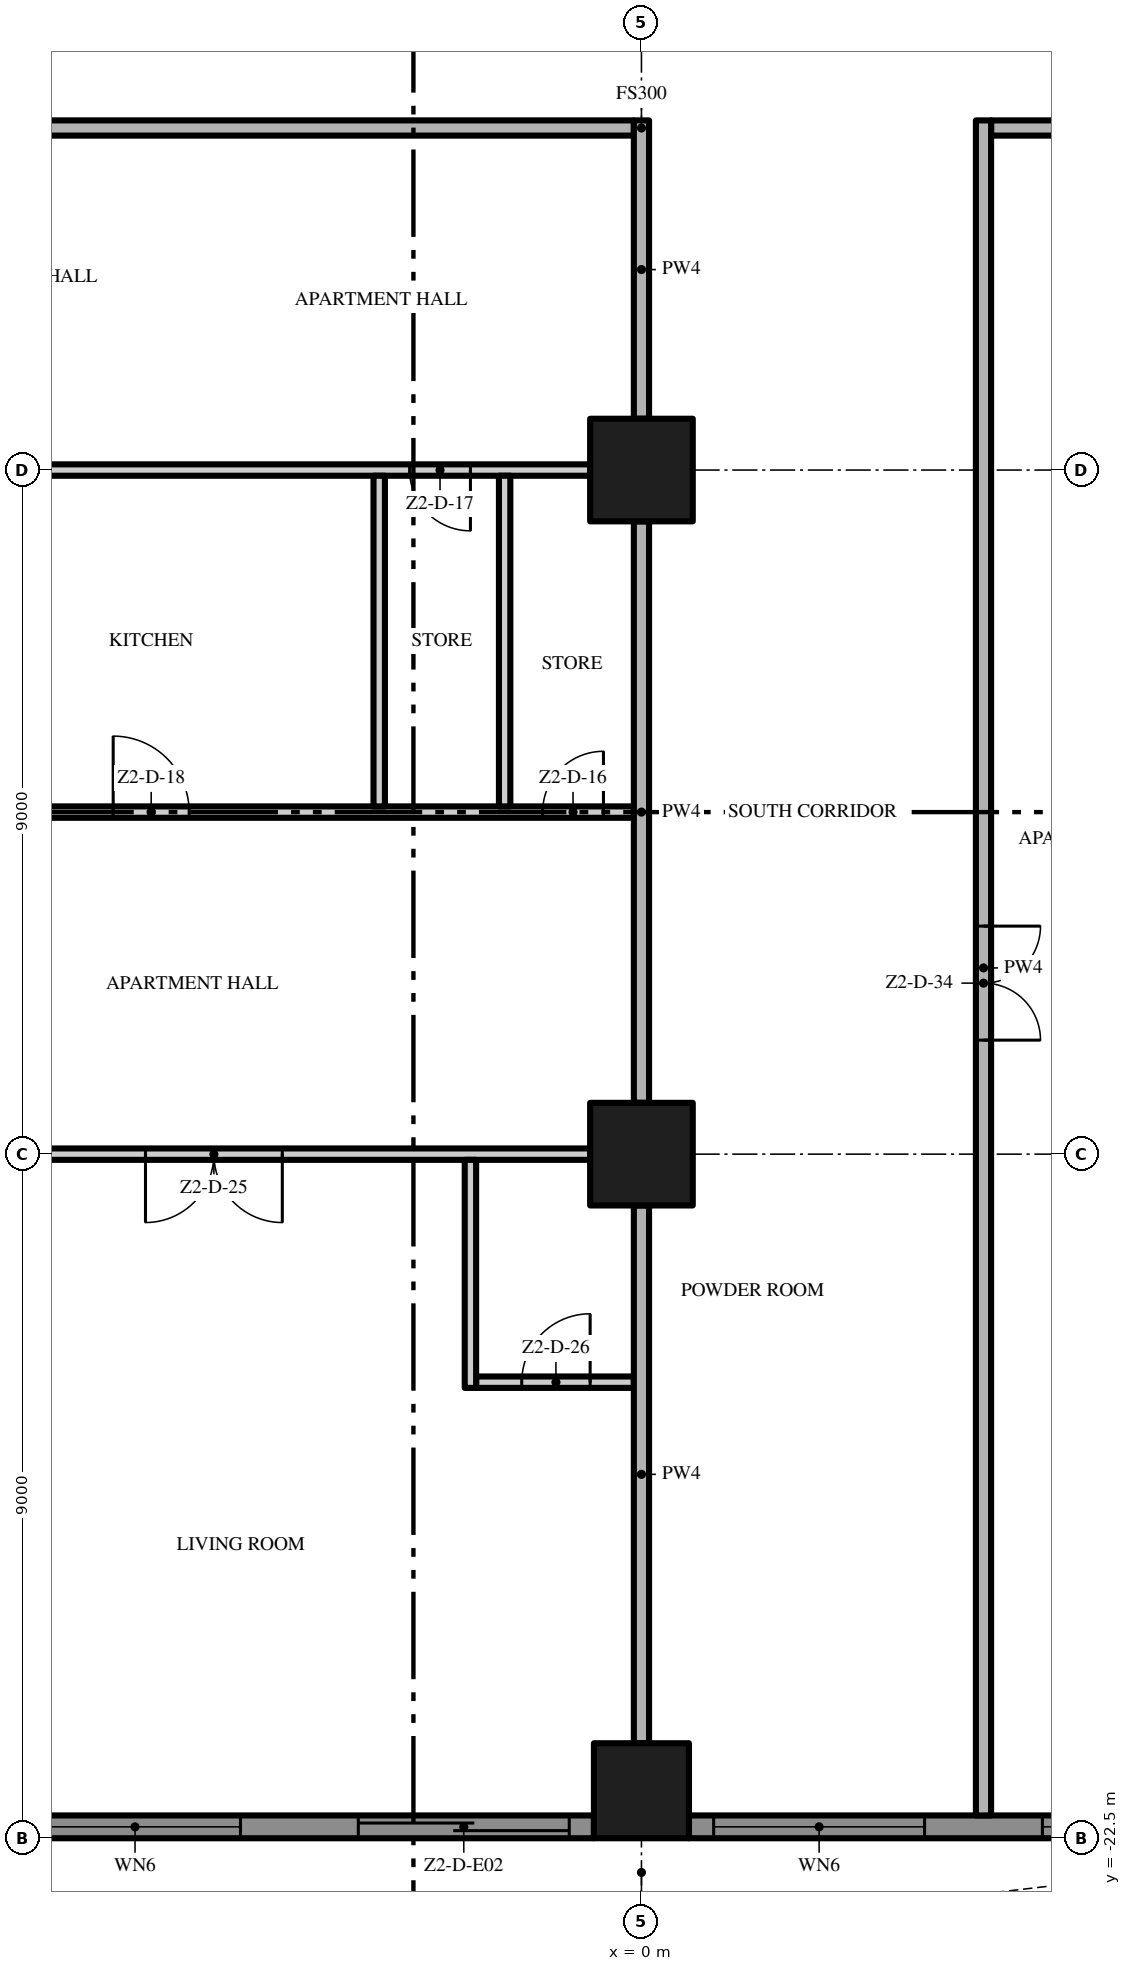
"""IFC4 building model, lengths in metres.
Left out: names, types, materials, properties, quantities, classifications, styles, units other than length and angle.
Written with IfcOpenShell. Run it as: python <this file> out.ifc"""

import sys

from ifc_helpers import new_model, si_unit, direction, frame, frame_2d, origin, origin_2d, place, context, subcontext, project, spatial, polyline, rectangle, outline, extrude, element, fill, save


model = new_model("IFC4")
c1 = context("Model", 3, precision=1e-05, world=origin(), true_north=direction((0.0, 1.0)))
c2 = subcontext(c1, "Body", "Model", "MODEL_VIEW")
j1 = project(units=[si_unit("LENGTHUNIT", "METRE"), si_unit("PLANEANGLEUNIT", "RADIAN")], contexts=[c1])
p1 = place(None, origin())
s1 = spatial("IfcSite", under=j1, at=p1, CompositionType="ELEMENT")
p2 = place(p1, origin())
s2 = spatial("IfcBuilding", under=s1, at=p2, CompositionType="ELEMENT")
p3 = place(p2, frame((0.0, 0.0, 103.6)))
s3 = spatial("IfcBuildingStorey", under=s2, at=p3, CompositionType="ELEMENT", Elevation=103.6)
p4 = place(p3, frame((0.0, -13.5, 0.0), z_axis=(0.0, 0.0, 1.0), x_axis=(1.0, 0.0, 0.0)))
e1 = element("IfcColumn", 1, at=p4, inside=s3, PredefinedType="COLUMN", context=c2, shape_type="SweptSolid", body=[
    extrude(rectangle(XDim=1.35, YDim=1.35, at=origin_2d()), origin(), (0.0, 0.0, 1.0), 3.5),
])
p5 = place(p3, frame((0.0, -21.875, 0.0), z_axis=(0.0, 0.0, 1.0), x_axis=(1.0, 0.0, 0.0)))
e2 = element("IfcColumn", 2, at=p5, inside=s3, PredefinedType="COLUMN", context=c2, shape_type="SweptSolid", body=[
    extrude(rectangle(XDim=1.25, YDim=1.25, at=origin_2d()), origin(), (0.0, 0.0, 1.0), 3.5),
])
p6 = place(p3, frame((0.0, -4.5, 0.0), z_axis=(0.0, 0.0, 1.0), x_axis=(1.0, 0.0, 0.0)))
e3 = element("IfcColumn", 3, at=p6, inside=s3, PredefinedType="COLUMN", context=c2, shape_type="SweptSolid", body=[
    extrude(rectangle(XDim=1.35, YDim=1.35, at=origin_2d()), origin(), (0.0, 0.0, 1.0), 3.5),
])
p7 = place(p3, frame((-0.625, -22.35, 0.0), z_axis=(0.0, 0.0, 1.0), x_axis=(-1.0, 0.0, 0.0)))
e4 = element("IfcWall", 4, at=p7, inside=s3, PredefinedType="SOLIDWALL", context=c2, shape_type="SweptSolid", body=[
    extrude(rectangle(XDim=7.75, YDim=0.3, at=frame_2d((3.875, 0.0))), origin(), (0.0, 0.0, 1.0), 3.5),
])
p8 = place(p7, frame((4.65, 0.0, 0.45)))
e5 = element("IfcOpeningElement", 5, at=p8, cuts=e4, PredefinedType="OPENING", context=c2, shape_type="SweptSolid", body=[
    extrude(rectangle(XDim=2.775, YDim=2.65, at=frame_2d((1.387, 1.325))), frame((0.0, 0.16, 0.0), z_axis=(0.0, -1.0, 0.0), x_axis=(1.0, 0.0, 0.0)), (0.0, 0.0, 1.0), 0.32),
])
p9 = place(p7, frame((0.325, 0.0, 0.0)))
e6 = element("IfcOpeningElement", 6, at=p9, cuts=e4, PredefinedType="OPENING", context=c2, shape_type="SweptSolid", body=[
    extrude(rectangle(XDim=2.775, YDim=2.4, at=frame_2d((1.387, 1.2))), frame((0.0, 0.16, 0.0), z_axis=(0.0, -1.0, 0.0), x_axis=(1.0, 0.0, 0.0)), (0.0, 0.0, 1.0), 0.32),
])
p10 = place(p3, frame((8.375, -22.35, 0.0), z_axis=(0.0, 0.0, 1.0), x_axis=(-1.0, 0.0, 0.0)))
e7 = element("IfcWall", 7, at=p10, inside=s3, PredefinedType="SOLIDWALL", context=c2, shape_type="SweptSolid", body=[
    extrude(rectangle(XDim=7.75, YDim=0.3, at=frame_2d((3.875, 0.0))), origin(), (0.0, 0.0, 1.0), 3.5),
])
p11 = place(p10, frame((4.65, 0.0, 0.45)))
e8 = element("IfcOpeningElement", 8, at=p11, cuts=e7, PredefinedType="OPENING", context=c2, shape_type="SweptSolid", body=[
    extrude(rectangle(XDim=2.775, YDim=2.65, at=frame_2d((1.387, 1.325))), frame((0.0, 0.16, 0.0), z_axis=(0.0, -1.0, 0.0), x_axis=(1.0, 0.0, 0.0)), (0.0, 0.0, 1.0), 0.32),
])
p12 = place(p10, frame((0.325, 0.0, 0.45)))
e9 = element("IfcOpeningElement", 9, at=p12, cuts=e7, PredefinedType="OPENING", context=c2, shape_type="SweptSolid", body=[
    extrude(rectangle(XDim=2.775, YDim=2.65, at=frame_2d((1.387, 1.325))), frame((0.0, 0.16, 0.0), z_axis=(0.0, -1.0, 0.0), x_axis=(1.0, 0.0, 0.0)), (0.0, 0.0, 1.0), 0.32),
])
p13 = place(p3, origin())
e10 = element("IfcWall", 10, at=p13, inside=s3, PredefinedType="USERDEFINED", context=c2, shape_type="SweptSolid", body=[
    extrude(outline(polyline([(-22.5, -23.451), (-21.0, -24.112), (-19.5, -24.845), (-18.0, -25.369), (-16.875, -25.5), (-16.5, -25.485), (-15.0, -25.149), (-13.5, -24.488), (-12.0, -23.755), (-10.5, -23.231), (-9.375, -23.1), (-9.0, -23.115), (-7.5, -23.451), (-6.0, -24.112), (-4.5, -24.845), (-3.0, -25.369), (-1.875, -25.5), (-1.5, -25.485), (0.0, -25.149), (1.5, -24.488), (3.0, -23.755), (4.5, -23.231), (5.625, -23.1), (6.0, -23.115), (7.5, -23.451), (9.0, -24.112), (10.5, -24.845), (12.0, -25.369), (13.125, -25.5), (13.5, -25.485), (15.0, -25.149), (16.5, -24.488), (18.0, -23.755), (19.5, -23.231), (20.625, -23.1), (21.0, -23.115), (22.5, -23.451), (22.555, -23.208), (21.033, -22.866), (20.615, -22.849), (19.444, -22.986), (17.904, -23.524), (16.395, -24.261), (14.921, -24.91), (13.467, -25.236), (13.135, -25.249), (12.056, -25.124), (10.596, -24.614), (9.105, -23.885), (7.579, -23.213), (6.033, -22.866), (5.615, -22.849), (4.444, -22.986), (2.904, -23.524), (1.395, -24.261), (-0.079, -24.91), (-1.533, -25.236), (-1.865, -25.249), (-2.944, -25.124), (-4.404, -24.614), (-5.895, -23.885), (-7.421, -23.213), (-8.967, -22.866), (-9.385, -22.849), (-10.556, -22.986), (-12.096, -23.524), (-13.605, -24.261), (-15.079, -24.91), (-16.533, -25.236), (-16.865, -25.249), (-17.944, -25.124), (-19.404, -24.614), (-20.895, -23.885), (-22.399, -23.223), (-22.5, -23.451)])), origin(), (0.0, 0.0, 1.0), 0.9),
])
p14 = place(p3, frame((-2.175, -16.5, 0.0), z_axis=(0.0, 0.0, 1.0), x_axis=(1.0, 0.0, 0.0)))
e11 = element("IfcWall", 11, at=p14, inside=s3, PredefinedType="PARTITIONING", context=c2, shape_type="SweptSolid", body=[
    extrude(rectangle(XDim=2.075, YDim=0.15, at=frame_2d((1.038, 0.0))), origin(), (0.0, 0.0, 1.0), 3.5),
])
p15 = place(p14, frame((0.6, 0.0, 0.0)))
e12 = element("IfcOpeningElement", 12, at=p15, cuts=e11, PredefinedType="OPENING", context=c2, shape_type="SweptSolid", body=[
    extrude(rectangle(XDim=0.9, YDim=2.1, at=frame_2d((0.45, 1.05))), frame((0.0, 0.085, 0.0), z_axis=(0.0, -1.0, 0.0), x_axis=(1.0, 0.0, 0.0)), (0.0, 0.0, 1.0), 0.17),
])
p16 = place(p3, frame((-0.675, -13.5, 0.0), z_axis=(0.0, 0.0, 1.0), x_axis=(-1.0, 0.0, 0.0)))
e13 = element("IfcWall", 13, at=p16, inside=s3, PredefinedType="PARTITIONING", context=c2, shape_type="SweptSolid", body=[
    extrude(rectangle(XDim=7.65, YDim=0.15, at=frame_2d((3.825, 0.0))), origin(), (0.0, 0.0, 1.0), 3.5),
])
p17 = place(p16, frame((4.05, 0.0, 0.0)))
e14 = element("IfcOpeningElement", 14, at=p17, cuts=e13, PredefinedType="OPENING", context=c2, shape_type="SweptSolid", body=[
    extrude(rectangle(XDim=1.8, YDim=2.4, at=frame_2d((0.9, 1.2))), frame((0.0, 0.085, 0.0), z_axis=(0.0, -1.0, 0.0), x_axis=(1.0, 0.0, 0.0)), (0.0, 0.0, 1.0), 0.17),
])
p18 = place(p3, frame((-11.625, -9.0, 0.0), z_axis=(0.0, 0.0, 1.0), x_axis=(1.0, 0.0, 0.0)))
e15 = element("IfcWall", 15, at=p18, inside=s3, PredefinedType="PARTITIONING", context=c2, shape_type="SweptSolid", body=[
    extrude(rectangle(XDim=11.525, YDim=0.15, at=frame_2d((5.763, 0.0))), origin(), (0.0, 0.0, 1.0), 3.5),
])
p19 = place(p18, frame((10.325, 0.0, 0.0)))
e16 = element("IfcOpeningElement", 16, at=p19, cuts=e15, PredefinedType="OPENING", context=c2, shape_type="SweptSolid", body=[
    extrude(rectangle(XDim=0.8, YDim=2.0, at=frame_2d((0.4, 1.0))), frame((0.0, 0.085, 0.0), z_axis=(0.0, -1.0, 0.0), x_axis=(1.0, 0.0, 0.0)), (0.0, 0.0, 1.0), 0.17),
])
p20 = place(p18, frame((4.675, 0.0, 0.0)))
e17 = element("IfcOpeningElement", 17, at=p20, cuts=e15, PredefinedType="OPENING", context=c2, shape_type="SweptSolid", body=[
    extrude(rectangle(XDim=1.0, YDim=2.4, at=frame_2d((0.5, 1.2))), frame((0.0, 0.085, 0.0), z_axis=(0.0, -1.0, 0.0), x_axis=(1.0, 0.0, 0.0)), (0.0, 0.0, 1.0), 0.17),
])
p21 = place(p3, frame((-0.675, -4.5, 0.0), z_axis=(0.0, 0.0, 1.0), x_axis=(-1.0, 0.0, 0.0)))
e18 = element("IfcWall", 18, at=p21, inside=s3, PredefinedType="PARTITIONING", context=c2, shape_type="SweptSolid", body=[
    extrude(rectangle(XDim=7.65, YDim=0.15, at=frame_2d((3.825, 0.0))), origin(), (0.0, 0.0, 1.0), 3.5),
])
p22 = place(p21, frame((1.575, 0.0, 0.0)))
e19 = element("IfcOpeningElement", 19, at=p22, cuts=e18, PredefinedType="OPENING", context=c2, shape_type="SweptSolid", body=[
    extrude(rectangle(XDim=0.8, YDim=2.0, at=frame_2d((0.4, 1.0))), frame((0.0, 0.085, 0.0), z_axis=(0.0, -1.0, 0.0), x_axis=(1.0, 0.0, 0.0)), (0.0, 0.0, 1.0), 0.17),
])
p23 = place(p3, frame((-0.1, 0.0, 0.0), z_axis=(0.0, 0.0, 1.0), x_axis=(-1.0, 0.0, 0.0)))
e20 = element("IfcWall", 20, at=p23, inside=s3, PredefinedType="PARTITIONING", context=c2, shape_type="SweptSolid", body=[
    extrude(rectangle(XDim=17.3, YDim=0.2, at=frame_2d((8.65, 0.0))), origin(), (0.0, 0.0, 1.0), 3.5),
])
p24 = place(p23, frame((8.15, 0.0, 0.0)))
e21 = element("IfcOpeningElement", 21, at=p24, cuts=e20, PredefinedType="OPENING", context=c2, shape_type="SweptSolid", body=[
    extrude(rectangle(XDim=1.5, YDim=2.4, at=frame_2d((0.75, 1.2))), frame((0.0, 0.11, 0.0), z_axis=(0.0, -1.0, 0.0), x_axis=(1.0, 0.0, 0.0)), (0.0, 0.0, 1.0), 0.22),
])
p25 = place(p3, frame((4.6, 0.0, 0.0), z_axis=(0.0, 0.0, 1.0), x_axis=(1.0, 0.0, 0.0)))
e22 = element("IfcWall", 22, at=p25, inside=s3, PredefinedType="PARTITIONING", context=c2, shape_type="SweptSolid", body=[
    extrude(rectangle(XDim=12.8, YDim=0.2, at=frame_2d((6.4, 0.0))), origin(), (0.0, 0.0, 1.0), 3.5),
])
p26 = place(p3, frame((-3.45, -8.925, 0.0), z_axis=(0.0, 0.0, 1.0), x_axis=(0.0, 1.0, 0.0)))
e23 = element("IfcWall", 23, at=p26, inside=s3, PredefinedType="PARTITIONING", context=c2, shape_type="SweptSolid", body=[
    extrude(rectangle(XDim=4.35, YDim=0.15, at=frame_2d((2.175, 0.0))), origin(), (0.0, 0.0, 1.0), 3.5),
])
p27 = place(p3, frame((-2.25, -16.575, 0.0), z_axis=(0.0, 0.0, 1.0), x_axis=(0.0, 1.0, 0.0)))
e24 = element("IfcWall", 24, at=p27, inside=s3, PredefinedType="PARTITIONING", context=c2, shape_type="SweptSolid", body=[
    extrude(rectangle(XDim=3.0, YDim=0.15, at=frame_2d((1.5, 0.0))), origin(), (0.0, 0.0, 1.0), 3.5),
])
p28 = place(p3, frame((-1.8, -8.925, 0.0), z_axis=(0.0, 0.0, 1.0), x_axis=(0.0, 1.0, 0.0)))
e25 = element("IfcWall", 25, at=p28, inside=s3, PredefinedType="PARTITIONING", context=c2, shape_type="SweptSolid", body=[
    extrude(rectangle(XDim=4.35, YDim=0.15, at=frame_2d((2.175, 0.0))), origin(), (0.0, 0.0, 1.0), 3.5),
])
p29 = place(p3, frame((0.0, -21.25, 0.0), z_axis=(0.0, 0.0, 1.0), x_axis=(0.0, 1.0, 0.0)))
e26 = element("IfcWall", 26, at=p29, inside=s3, PredefinedType="PARTITIONING", context=c2, shape_type="SweptSolid", body=[
    extrude(rectangle(XDim=7.075, YDim=0.2, at=frame_2d((3.538, 0.0))), origin(), (0.0, 0.0, 1.0), 3.5),
])
p30 = place(p3, frame((0.0, -12.825, 0.0), z_axis=(0.0, 0.0, 1.0), x_axis=(0.0, 1.0, 0.0)))
e27 = element("IfcWall", 27, at=p30, inside=s3, PredefinedType="PARTITIONING", context=c2, shape_type="SweptSolid", body=[
    extrude(rectangle(XDim=7.65, YDim=0.2, at=frame_2d((3.825, 0.0))), origin(), (0.0, 0.0, 1.0), 3.5),
])
p31 = place(p3, frame((0.0, -3.825, 0.0), z_axis=(0.0, 0.0, 1.0), x_axis=(0.0, 1.0, 0.0)))
e28 = element("IfcWall", 28, at=p31, inside=s3, PredefinedType="PARTITIONING", context=c2, shape_type="SweptSolid", body=[
    extrude(rectangle(XDim=3.925, YDim=0.2, at=frame_2d((1.962, 0.0))), origin(), (0.0, 0.0, 1.0), 3.5),
])
p32 = place(p3, frame((4.5, 0.1, 0.0), z_axis=(0.0, 0.0, 1.0), x_axis=(0.0, -1.0, 0.0)))
e29 = element("IfcWall", 29, at=p32, inside=s3, PredefinedType="PARTITIONING", context=c2, shape_type="SweptSolid", body=[
    extrude(rectangle(XDim=22.3, YDim=0.2, at=frame_2d((11.15, 0.0))), origin(), (0.0, 0.0, 1.0), 3.5),
])
p33 = place(p32, frame((10.6, 0.0, 0.0)))
e30 = element("IfcOpeningElement", 30, at=p33, cuts=e29, PredefinedType="OPENING", context=c2, shape_type="SweptSolid", body=[
    extrude(rectangle(XDim=1.5, YDim=2.4, at=frame_2d((0.75, 1.2))), frame((0.0, 0.11, 0.0), z_axis=(0.0, -1.0, 0.0), x_axis=(1.0, 0.0, 0.0)), (0.0, 0.0, 1.0), 0.22),
])
p34 = place(p8, origin())
e31 = element("IfcWindow", 31, at=p34, inside=s3, PartitioningType="SINGLE_PANEL", PredefinedType="WINDOW", context=c2, shape_type="SweptSolid", body=[
    extrude(rectangle(XDim=2.775, YDim=2.65, at=frame_2d((1.387, 1.325))), frame((0.0, 0.03, 0.0), z_axis=(0.0, -1.0, 0.0), x_axis=(1.0, 0.0, 0.0)), (0.0, 0.0, 1.0), 0.06),
])
fill(e5, e31)
p35 = place(p9, origin())
e32 = element("IfcDoor", 32, at=p35, inside=s3, OperationType="SINGLE_SWING_LEFT", PredefinedType="DOOR", context=c2, shape_type="SweptSolid", body=[
    extrude(rectangle(XDim=2.775, YDim=2.4, at=frame_2d((1.387, 1.2))), frame((0.0, 0.025, 0.0), z_axis=(0.0, -1.0, 0.0), x_axis=(1.0, 0.0, 0.0)), (0.0, 0.0, 1.0), 0.05),
])
fill(e6, e32)
p36 = place(p11, origin())
e33 = element("IfcWindow", 33, at=p36, inside=s3, PartitioningType="SINGLE_PANEL", PredefinedType="WINDOW", context=c2, shape_type="SweptSolid", body=[
    extrude(rectangle(XDim=2.775, YDim=2.65, at=frame_2d((1.387, 1.325))), frame((0.0, 0.03, 0.0), z_axis=(0.0, -1.0, 0.0), x_axis=(1.0, 0.0, 0.0)), (0.0, 0.0, 1.0), 0.06),
])
fill(e8, e33)
p37 = place(p12, origin())
e34 = element("IfcWindow", 34, at=p37, inside=s3, PartitioningType="SINGLE_PANEL", PredefinedType="WINDOW", context=c2, shape_type="SweptSolid", body=[
    extrude(rectangle(XDim=2.775, YDim=2.65, at=frame_2d((1.387, 1.325))), frame((0.0, 0.03, 0.0), z_axis=(0.0, -1.0, 0.0), x_axis=(1.0, 0.0, 0.0)), (0.0, 0.0, 1.0), 0.06),
])
fill(e9, e34)
p38 = place(p19, origin())
e35 = element("IfcDoor", 35, at=p38, inside=s3, OperationType="SINGLE_SWING_RIGHT", PredefinedType="DOOR", context=c2, shape_type="SweptSolid", body=[
    extrude(rectangle(XDim=0.8, YDim=2.0, at=frame_2d((0.4, 1.0))), frame((0.0, 0.025, 0.0), z_axis=(0.0, -1.0, 0.0), x_axis=(1.0, 0.0, 0.0)), (0.0, 0.0, 1.0), 0.05),
])
fill(e16, e35)
p39 = place(p22, origin())
e36 = element("IfcDoor", 36, at=p39, inside=s3, OperationType="SINGLE_SWING_LEFT", PredefinedType="DOOR", context=c2, shape_type="SweptSolid", body=[
    extrude(rectangle(XDim=0.8, YDim=2.0, at=frame_2d((0.4, 1.0))), frame((0.0, 0.025, 0.0), z_axis=(0.0, -1.0, 0.0), x_axis=(1.0, 0.0, 0.0)), (0.0, 0.0, 1.0), 0.05),
])
fill(e19, e36)
p40 = place(p20, origin())
e37 = element("IfcDoor", 37, at=p40, inside=s3, OperationType="SINGLE_SWING_LEFT", PredefinedType="DOOR", context=c2, shape_type="SweptSolid", body=[
    extrude(rectangle(XDim=1.0, YDim=2.4, at=frame_2d((0.5, 1.2))), frame((0.0, 0.025, 0.0), z_axis=(0.0, -1.0, 0.0), x_axis=(1.0, 0.0, 0.0)), (0.0, 0.0, 1.0), 0.05),
])
fill(e17, e37)
p41 = place(p17, origin())
e38 = element("IfcDoor", 38, at=p41, inside=s3, OperationType="DOUBLE_DOOR_SINGLE_SWING", PredefinedType="DOOR", context=c2, shape_type="SweptSolid", body=[
    extrude(rectangle(XDim=1.8, YDim=2.4, at=frame_2d((0.9, 1.2))), frame((0.0, 0.025, 0.0), z_axis=(0.0, -1.0, 0.0), x_axis=(1.0, 0.0, 0.0)), (0.0, 0.0, 1.0), 0.05),
])
fill(e14, e38)
p42 = place(p15, origin())
e39 = element("IfcDoor", 39, at=p42, inside=s3, OperationType="SINGLE_SWING_RIGHT", PredefinedType="DOOR", context=c2, shape_type="SweptSolid", body=[
    extrude(rectangle(XDim=0.9, YDim=2.1, at=frame_2d((0.45, 1.05))), frame((0.0, 0.025, 0.0), z_axis=(0.0, -1.0, 0.0), x_axis=(1.0, 0.0, 0.0)), (0.0, 0.0, 1.0), 0.05),
])
fill(e12, e39)
p43 = place(p33, origin())
e40 = element("IfcDoor", 40, at=p43, inside=s3, OperationType="DOUBLE_DOOR_SINGLE_SWING", PredefinedType="DOOR", context=c2, shape_type="SweptSolid", body=[
    extrude(rectangle(XDim=1.5, YDim=2.4, at=frame_2d((0.75, 1.2))), frame((0.0, 0.025, 0.0), z_axis=(0.0, -1.0, 0.0), x_axis=(1.0, 0.0, 0.0)), (0.0, 0.0, 1.0), 0.05),
])
fill(e30, e40)
save(model, sys.argv[1])
